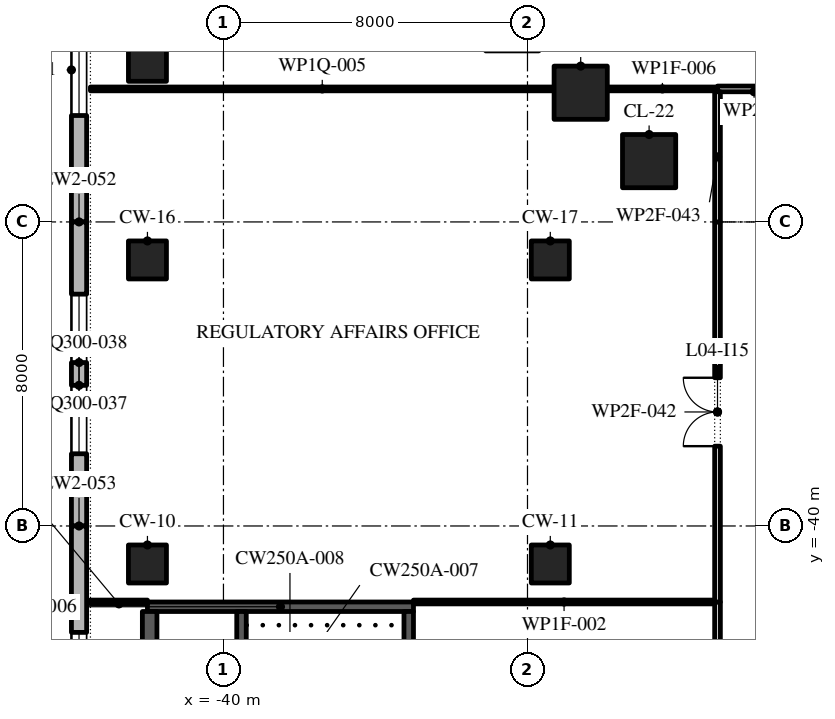
"""IFC4 building model, lengths in metres.
Left out: names, types, materials, properties, quantities, classifications, styles, units other than length and angle.
Written with IfcOpenShell. Run it as: python <this file> out.ifc"""

import sys

from ifc_helpers import new_model, si_unit, direction, frame, frame_2d, origin, origin_2d, place, context, subcontext, project, spatial, polyline, rectangle, outline, extrude, element, fill, save


model = new_model("IFC4")
c1 = context("Model", 3, precision=1e-05, world=origin(), true_north=direction((0.0, 1.0)))
c2 = subcontext(c1, "Body", "Model", "MODEL_VIEW")
j1 = project(units=[si_unit("LENGTHUNIT", "METRE"), si_unit("PLANEANGLEUNIT", "RADIAN")], contexts=[c1])
p1 = place(None, origin())
s1 = spatial("IfcSite", under=j1, at=p1, CompositionType="ELEMENT")
p2 = place(p1, origin())
s2 = spatial("IfcBuilding", under=s1, at=p2, CompositionType="ELEMENT")
p3 = place(p2, frame((0.0, 0.0, 24.0)))
s3 = spatial("IfcBuildingStorey", under=s2, at=p3, CompositionType="ELEMENT", Elevation=24.0)
for number, where, z_axis, x_axis in (
    (1, (-42.0, -41.0, 0.0), (0.0, 0.0, 1.0), (1.0, 0.0, 0.0)),
    (2, (-31.4, -41.0, 0.0), (0.0, 0.0, 1.0), (1.0, 0.0, 0.0)),
    (3, (-42.0, -33.0, 0.0), (0.0, 0.0, 1.0), (1.0, 0.0, 0.0)),
    (4, (-31.4, -33.0, 0.0), (0.0, 0.0, 1.0), (1.0, 0.0, 0.0)),
):
    element("IfcColumn", number, at=place(p3, frame(where, z_axis=z_axis, x_axis=x_axis)), inside=s3, PredefinedType="COLUMN", context=c2, shape_type="SweptSolid", body=[
        extrude(rectangle(XDim=1.0, YDim=1.0, at=origin_2d()), origin(), (0.0, 0.0, 1.0), 4.8),
    ])
for number, where, z_axis, x_axis in (
    (5, (-28.8, -30.4, 0.0), (0.0, 0.0, 1.0), (1.0, 0.0, 0.0)),
    (6, (-30.6, -28.6, 0.0), (0.0, 0.0, 1.0), (1.0, 0.0, 0.0)),
):
    element("IfcColumn", number, at=place(p3, frame(where, z_axis=z_axis, x_axis=x_axis)), inside=s3, PredefinedType="COLUMN", context=c2, shape_type="SweptSolid", body=[
        extrude(rectangle(XDim=1.4, YDim=1.4, at=origin_2d()), origin(), (0.0, 0.0, 1.0), 4.8),
    ])
p4 = place(p3, frame((-42.0, -27.8, 0.0), z_axis=(0.0, 0.0, 1.0), x_axis=(1.0, 0.0, 0.0)))
e7 = element("IfcColumn", 7, at=p4, inside=s3, PredefinedType="COLUMN", context=c2, shape_type="SweptSolid", body=[
    extrude(rectangle(XDim=1.0, YDim=1.0, at=origin_2d()), origin(), (0.0, 0.0, 1.0), 4.8),
])
p5 = place(p3, frame((-43.8, -24.0, 0.0), z_axis=(0.0, 0.0, 1.0), x_axis=(0.0, -1.0, 0.0)))
e8 = element("IfcWall", 8, at=p5, inside=s3, PredefinedType="STANDARD", context=c2, shape_type="SweptSolid", body=[
    extrude(rectangle(XDim=8.0, YDim=0.4, at=frame_2d((4.0, 0.0))), origin(), (0.0, 0.0, 1.0), 4.5),
])
p6 = place(p5, frame((2.8, 0.0, 0.9)))
e9 = element("IfcOpeningElement", 9, at=p6, cuts=e8, PredefinedType="OPENING", context=c2, shape_type="SweptSolid", body=[
    extrude(outline(polyline([(0.0, 0.0), (2.4, 0.0), (2.4, 1.5), (2.378, 1.758), (2.313, 2.009), (2.207, 2.245), (2.063, 2.46), (1.885, 2.648), (1.677, 2.804), (1.447, 2.922), (1.2, 3.0), (0.953, 2.922), (0.722, 2.804), (0.515, 2.648), (0.337, 2.46), (0.193, 2.245), (0.087, 2.009), (0.022, 1.758), (0.0, 1.5), (0.0, 0.0)])), frame((0.0, 0.21, 0.0), z_axis=(0.0, -1.0, 0.0), x_axis=(1.0, 0.0, 0.0)), (0.0, 0.0, 1.0), 0.42),
])
p7 = place(p3, frame((-43.8, -32.0, 0.0), z_axis=(0.0, 0.0, 1.0), x_axis=(0.0, -1.0, 0.0)))
e10 = element("IfcWall", 10, at=p7, inside=s3, PredefinedType="STANDARD", context=c2, shape_type="SweptSolid", body=[
    extrude(rectangle(XDim=8.0, YDim=0.4, at=frame_2d((4.0, 0.0))), origin(), (0.0, 0.0, 1.0), 4.5),
])
p8 = place(p7, frame((1.9, 0.0, 0.9)))
e11 = element("IfcOpeningElement", 11, at=p8, cuts=e10, PredefinedType="OPENING", context=c2, shape_type="SweptSolid", body=[
    extrude(outline(polyline([(0.0, 0.0), (1.8, 0.0), (1.8, 1.5), (1.785, 1.729), (1.738, 1.954), (1.662, 2.17), (1.558, 2.375), (1.427, 2.563), (1.271, 2.732), (1.095, 2.879), (0.9, 3.0), (0.705, 2.879), (0.529, 2.732), (0.373, 2.563), (0.242, 2.375), (0.138, 2.17), (0.062, 1.954), (0.015, 1.729), (0.0, 1.5), (0.0, 0.0)])), frame((0.0, 0.21, 0.0), z_axis=(0.0, -1.0, 0.0), x_axis=(1.0, 0.0, 0.0)), (0.0, 0.0, 1.0), 0.42),
])
p9 = place(p7, frame((4.3, 0.0, 0.9)))
e12 = element("IfcOpeningElement", 12, at=p9, cuts=e10, PredefinedType="OPENING", context=c2, shape_type="SweptSolid", body=[
    extrude(outline(polyline([(0.0, 0.0), (1.8, 0.0), (1.8, 1.5), (1.785, 1.729), (1.738, 1.954), (1.662, 2.17), (1.558, 2.375), (1.427, 2.563), (1.271, 2.732), (1.095, 2.879), (0.9, 3.0), (0.705, 2.879), (0.529, 2.732), (0.373, 2.563), (0.242, 2.375), (0.138, 2.17), (0.062, 1.954), (0.015, 1.729), (0.0, 1.5), (0.0, 0.0)])), frame((0.0, 0.21, 0.0), z_axis=(0.0, -1.0, 0.0), x_axis=(1.0, 0.0, 0.0)), (0.0, 0.0, 1.0), 0.42),
])
p10 = place(p3, frame((-43.8, -40.0, 0.0), z_axis=(0.0, 0.0, 1.0), x_axis=(0.0, -1.0, 0.0)))
e13 = element("IfcWall", 13, at=p10, inside=s3, PredefinedType="STANDARD", context=c2, shape_type="SweptSolid", body=[
    extrude(rectangle(XDim=8.0, YDim=0.4, at=frame_2d((4.0, 0.0))), origin(), (0.0, 0.0, 1.0), 4.5),
])
p11 = place(p10, frame((2.8, 0.0, 0.9)))
e14 = element("IfcOpeningElement", 14, at=p11, cuts=e13, PredefinedType="OPENING", context=c2, shape_type="SweptSolid", body=[
    extrude(outline(polyline([(0.0, 0.0), (2.4, 0.0), (2.4, 1.5), (2.378, 1.758), (2.313, 2.009), (2.207, 2.245), (2.063, 2.46), (1.885, 2.648), (1.677, 2.804), (1.447, 2.922), (1.2, 3.0), (0.953, 2.922), (0.722, 2.804), (0.515, 2.648), (0.337, 2.46), (0.193, 2.245), (0.087, 2.009), (0.022, 1.758), (0.0, 1.5), (0.0, 0.0)])), frame((0.0, 0.21, 0.0), z_axis=(0.0, -1.0, 0.0), x_axis=(1.0, 0.0, 0.0)), (0.0, 0.0, 1.0), 0.42),
])
p12 = place(p3, frame((-42.0, -42.125, 0.0), z_axis=(0.0, 0.0, 1.0), x_axis=(1.0, 0.0, 0.0)))
e15 = element("IfcWall", 15, at=p12, inside=s3, PredefinedType="SHEAR", context=c2, shape_type="SweptSolid", body=[
    extrude(rectangle(XDim=7.0, YDim=0.25, at=frame_2d((3.5, 0.0))), origin(), (0.0, 0.0, 1.0), 4.5),
])
p13 = place(p3, frame((-41.942, -49.5, 0.0), z_axis=(0.0, 0.0, 1.0), x_axis=(0.0, 1.0, 0.0)))
e16 = element("IfcWall", 16, at=p13, inside=s3, PredefinedType="SHEAR", context=c2, shape_type="SweptSolid", body=[
    extrude(rectangle(XDim=7.25, YDim=0.384, at=frame_2d((3.625, 0.0))), origin(), (0.0, 0.0, 1.0), 4.5),
])
p14 = place(p13, frame((3.05, 0.0, 0.0)))
e17 = element("IfcOpeningElement", 17, at=p14, cuts=e16, PredefinedType="OPENING", context=c2, shape_type="SweptSolid", body=[
    extrude(rectangle(XDim=0.9, YDim=2.1, at=frame_2d((0.45, 1.05))), frame((0.0, 0.202, 0.0), z_axis=(0.0, -1.0, 0.0), x_axis=(1.0, 0.0, 0.0)), (0.0, 0.0, 1.0), 0.404),
])
p15 = place(p3, frame((-35.125, -49.75, 0.0), z_axis=(0.0, 0.0, 1.0), x_axis=(0.0, 1.0, 0.0)))
e18 = element("IfcWall", 18, at=p15, inside=s3, PredefinedType="SHEAR", context=c2, shape_type="SweptSolid", body=[
    extrude(rectangle(XDim=7.5, YDim=0.25, at=frame_2d((3.75, 0.0))), origin(), (0.0, 0.0, 1.0), 4.5),
])
p16 = place(p15, frame((0.6, 0.0, 0.0)))
e19 = element("IfcOpeningElement", 19, at=p16, cuts=e18, PredefinedType="OPENING", context=c2, shape_type="SweptSolid", body=[
    extrude(rectangle(XDim=1.2, YDim=2.1, at=frame_2d((0.6, 1.05))), frame((0.0, 0.135, 0.0), z_axis=(0.0, -1.0, 0.0), x_axis=(1.0, 0.0, 0.0)), (0.0, 0.0, 1.0), 0.27),
])
p17 = place(p3, frame((-39.525, -49.75, 0.0), z_axis=(0.0, 0.0, 1.0), x_axis=(0.0, 1.0, 0.0)))
e20 = element("IfcWall", 20, at=p17, inside=s3, PredefinedType="SHEAR", context=c2, shape_type="SweptSolid", body=[
    extrude(rectangle(XDim=7.5, YDim=0.25, at=frame_2d((3.75, 0.0))), origin(), (0.0, 0.0, 1.0), 4.5),
])
p18 = place(p3, frame((-43.5, -42.0, 0.0), z_axis=(0.0, 0.0, 1.0), x_axis=(1.0, 0.0, 0.0)))
e21 = element("IfcWall", 21, at=p18, inside=s3, PredefinedType="PARTITIONING", context=c2, shape_type="SweptSolid", body=[
    extrude(rectangle(XDim=1.5, YDim=0.1, at=frame_2d((0.75, 0.0))), origin(), (0.0, 0.0, 1.0), 4.5),
])
p19 = place(p3, frame((-35.0, -42.0, 0.0), z_axis=(0.0, 0.0, 1.0), x_axis=(1.0, 0.0, 0.0)))
e22 = element("IfcWall", 22, at=p19, inside=s3, PredefinedType="PARTITIONING", context=c2, shape_type="SweptSolid", body=[
    extrude(rectangle(XDim=7.925, YDim=0.1, at=frame_2d((3.962, 0.0))), origin(), (0.0, 0.0, 1.0), 4.5),
])
p20 = place(p3, frame((-43.5, -28.5, 0.0), z_axis=(0.0, 0.0, 1.0), x_axis=(1.0, 0.0, 0.0)))
e23 = element("IfcWall", 23, at=p20, inside=s3, PredefinedType="PARTITIONING", context=c2, shape_type="SweptSolid", body=[
    extrude(rectangle(XDim=12.2, YDim=0.1, at=frame_2d((6.1, 0.0))), origin(), (0.0, 0.0, 1.0), 3.964),
])
p21 = place(p3, frame((-29.9, -28.5, 0.0), z_axis=(0.0, 0.0, 1.0), x_axis=(1.0, 0.0, 0.0)))
e24 = element("IfcWall", 24, at=p21, inside=s3, PredefinedType="PARTITIONING", context=c2, shape_type="SweptSolid", body=[
    extrude(rectangle(XDim=2.9, YDim=0.1, at=frame_2d((1.45, 0.0))), origin(), (0.0, 0.0, 1.0), 4.5),
])
p22 = place(p3, frame((-27.0, -28.5, 0.0), z_axis=(0.0, 0.0, 1.0), x_axis=(1.0, 0.0, 0.0)))
e25 = element("IfcWall", 25, at=p22, inside=s3, PredefinedType="PARTITIONING", context=c2, shape_type="SweptSolid", body=[
    extrude(rectangle(XDim=1.925, YDim=0.15, at=frame_2d((0.962, 0.0))), origin(), (0.0, 0.0, 1.0), 4.5),
])
p23 = place(p3, frame((-27.0, -48.0, 0.0), z_axis=(0.0, 0.0, 1.0), x_axis=(0.0, 1.0, 0.0)))
e26 = element("IfcWall", 26, at=p23, inside=s3, PredefinedType="PARTITIONING", context=c2, shape_type="SweptSolid", body=[
    extrude(rectangle(XDim=6.0, YDim=0.15, at=frame_2d((3.0, 0.0))), origin(), (0.0, 0.0, 1.0), 4.5),
])
p24 = place(p23, frame((2.5, 0.0, 0.0)))
e27 = element("IfcOpeningElement", 27, at=p24, cuts=e26, PredefinedType="OPENING", context=c2, shape_type="SweptSolid", body=[
    extrude(rectangle(XDim=1.0, YDim=2.1, at=frame_2d((0.5, 1.05))), frame((0.0, 0.085, 0.0), z_axis=(0.0, -1.0, 0.0), x_axis=(1.0, 0.0, 0.0)), (0.0, 0.0, 1.0), 0.17),
])
p25 = place(p3, frame((-27.0, -42.0, 0.0), z_axis=(0.0, 0.0, 1.0), x_axis=(0.0, 1.0, 0.0)))
e28 = element("IfcWall", 28, at=p25, inside=s3, PredefinedType="PARTITIONING", context=c2, shape_type="SweptSolid", body=[
    extrude(rectangle(XDim=10.0, YDim=0.15, at=frame_2d((5.0, 0.0))), origin(), (0.0, 0.0, 1.0), 4.5),
])
p26 = place(p25, frame((4.1, 0.0, 0.0)))
e29 = element("IfcOpeningElement", 29, at=p26, cuts=e28, PredefinedType="OPENING", context=c2, shape_type="SweptSolid", body=[
    extrude(rectangle(XDim=1.8, YDim=2.1, at=frame_2d((0.9, 1.05))), frame((0.0, 0.085, 0.0), z_axis=(0.0, -1.0, 0.0), x_axis=(1.0, 0.0, 0.0)), (0.0, 0.0, 1.0), 0.17),
])
p27 = place(p3, frame((-27.0, -32.0, 0.0), z_axis=(0.0, 0.0, 1.0), x_axis=(0.0, 1.0, 0.0)))
e30 = element("IfcWall", 30, at=p27, inside=s3, PredefinedType="PARTITIONING", context=c2, shape_type="SweptSolid", body=[
    extrude(rectangle(XDim=3.425, YDim=0.15, at=frame_2d((1.712, 0.0))), origin(), (0.0, 0.0, 1.0), 4.5),
])
p28 = place(p6, origin())
e31 = element("IfcWindow", 31, at=p28, inside=s3, PartitioningType="DOUBLE_PANEL_VERTICAL", PredefinedType="WINDOW", context=c2, shape_type="SweptSolid", body=[
    extrude(outline(polyline([(0.0, 0.0), (2.4, 0.0), (2.4, 1.5), (2.378, 1.758), (2.313, 2.009), (2.207, 2.245), (2.063, 2.46), (1.885, 2.648), (1.677, 2.804), (1.447, 2.922), (1.2, 3.0), (0.953, 2.922), (0.722, 2.804), (0.515, 2.648), (0.337, 2.46), (0.193, 2.245), (0.087, 2.009), (0.022, 1.758), (0.0, 1.5), (0.0, 0.0)])), frame((0.0, 0.03, 0.0), z_axis=(0.0, -1.0, 0.0), x_axis=(1.0, 0.0, 0.0)), (0.0, 0.0, 1.0), 0.06),
])
fill(e9, e31)
p29 = place(p8, origin())
e32 = element("IfcWindow", 32, at=p29, inside=s3, PartitioningType="DOUBLE_PANEL_VERTICAL", PredefinedType="WINDOW", context=c2, shape_type="SweptSolid", body=[
    extrude(outline(polyline([(0.0, 0.0), (1.8, 0.0), (1.8, 1.5), (1.785, 1.729), (1.738, 1.954), (1.662, 2.17), (1.558, 2.375), (1.427, 2.563), (1.271, 2.732), (1.095, 2.879), (0.9, 3.0), (0.705, 2.879), (0.529, 2.732), (0.373, 2.563), (0.242, 2.375), (0.138, 2.17), (0.062, 1.954), (0.015, 1.729), (0.0, 1.5), (0.0, 0.0)])), frame((0.0, 0.03, 0.0), z_axis=(0.0, -1.0, 0.0), x_axis=(1.0, 0.0, 0.0)), (0.0, 0.0, 1.0), 0.06),
])
fill(e11, e32)
p30 = place(p9, origin())
e33 = element("IfcWindow", 33, at=p30, inside=s3, PartitioningType="DOUBLE_PANEL_VERTICAL", PredefinedType="WINDOW", context=c2, shape_type="SweptSolid", body=[
    extrude(outline(polyline([(0.0, 0.0), (1.8, 0.0), (1.8, 1.5), (1.785, 1.729), (1.738, 1.954), (1.662, 2.17), (1.558, 2.375), (1.427, 2.563), (1.271, 2.732), (1.095, 2.879), (0.9, 3.0), (0.705, 2.879), (0.529, 2.732), (0.373, 2.563), (0.242, 2.375), (0.138, 2.17), (0.062, 1.954), (0.015, 1.729), (0.0, 1.5), (0.0, 0.0)])), frame((0.0, 0.03, 0.0), z_axis=(0.0, -1.0, 0.0), x_axis=(1.0, 0.0, 0.0)), (0.0, 0.0, 1.0), 0.06),
])
fill(e12, e33)
p31 = place(p11, origin())
e34 = element("IfcWindow", 34, at=p31, inside=s3, PartitioningType="DOUBLE_PANEL_VERTICAL", PredefinedType="WINDOW", context=c2, shape_type="SweptSolid", body=[
    extrude(outline(polyline([(0.0, 0.0), (2.4, 0.0), (2.4, 1.5), (2.378, 1.758), (2.313, 2.009), (2.207, 2.245), (2.063, 2.46), (1.885, 2.648), (1.677, 2.804), (1.447, 2.922), (1.2, 3.0), (0.953, 2.922), (0.722, 2.804), (0.515, 2.648), (0.337, 2.46), (0.193, 2.245), (0.087, 2.009), (0.022, 1.758), (0.0, 1.5), (0.0, 0.0)])), frame((0.0, 0.03, 0.0), z_axis=(0.0, -1.0, 0.0), x_axis=(1.0, 0.0, 0.0)), (0.0, 0.0, 1.0), 0.06),
])
fill(e14, e34)
p32 = place(p26, origin())
e35 = element("IfcDoor", 35, at=p32, inside=s3, OperationType="SINGLE_SWING_LEFT", PredefinedType="DOOR", context=c2, shape_type="SweptSolid", body=[
    extrude(rectangle(XDim=1.8, YDim=2.1, at=frame_2d((0.9, 1.05))), frame((0.0, 0.025, 0.0), z_axis=(0.0, -1.0, 0.0), x_axis=(1.0, 0.0, 0.0)), (0.0, 0.0, 1.0), 0.05),
])
fill(e29, e35)
save(model, sys.argv[1])
